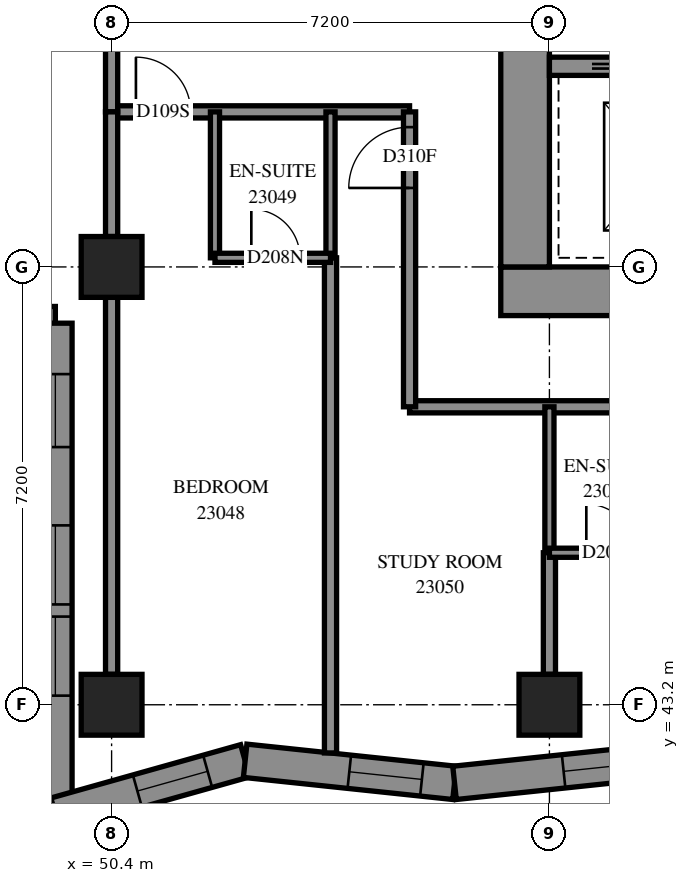
"""IFC4 building model, lengths in metres.
Left out: names, types, materials, properties, quantities, classifications, styles, units other than length and angle.
Written with IfcOpenShell. Run it as: python <this file> out.ifc"""

import sys

from ifc_helpers import new_model, si_unit, direction, frame, frame_2d, origin, origin_2d, place, context, subcontext, project, spatial, polyline, rectangle, outline, extrude, element, fill, save


model = new_model("IFC4")
c1 = context("Model", 3, precision=1e-05, world=origin(), true_north=direction((0.0, 1.0)))
c2 = subcontext(c1, "Body", "Model", "MODEL_VIEW")
j1 = project(units=[si_unit("LENGTHUNIT", "METRE"), si_unit("PLANEANGLEUNIT", "RADIAN")], contexts=[c1])
p1 = place(None, origin())
s1 = spatial("IfcSite", under=j1, at=p1, CompositionType="ELEMENT")
p2 = place(p1, origin())
s2 = spatial("IfcBuilding", under=s1, at=p2, CompositionType="ELEMENT")
p3 = place(p2, frame((0.0, 0.0, 88.0)))
s3 = spatial("IfcBuildingStorey", under=s2, at=p3, CompositionType="ELEMENT", Elevation=88.0)
for number, where, z_axis, x_axis in (
    (1, (50.4, 43.2, 0.0), (0.0, 0.0, 1.0), (1.0, 0.0, 0.0)),
    (2, (50.4, 50.4, 0.0), (0.0, 0.0, 1.0), (1.0, 0.0, 0.0)),
    (3, (57.6, 43.2, 0.0), (0.0, 0.0, 1.0), (1.0, 0.0, 0.0)),
):
    element("IfcColumn", number, at=place(p3, frame(where, z_axis=z_axis, x_axis=x_axis)), inside=s3, PredefinedType="COLUMN", context=c2, shape_type="SweptSolid", body=[
        extrude(rectangle(XDim=1.0, YDim=1.0, at=origin_2d()), origin(), (0.0, 0.0, 1.0), 3.1),
    ])
p4 = place(p3, frame((56.8, 50.0, -0.3), z_axis=(0.0, 0.0, 1.0), x_axis=(1.0, 0.0, 0.0)))
e4 = element("IfcWall", 4, at=p4, inside=s3, PredefinedType="SHEAR", context=c2, shape_type="SweptSolid", body=[
    extrude(rectangle(XDim=16.0, YDim=0.8, at=frame_2d((8.0, 0.0))), origin(), (0.0, 0.0, 1.0), 2.7),
])
p5 = place(p3, frame((57.2, 50.4, -0.3), z_axis=(0.0, 0.0, 1.0), x_axis=(0.0, 1.0, 0.0)))
e5 = element("IfcWall", 5, at=p5, inside=s3, PredefinedType="SHEAR", context=c2, shape_type="SweptSolid", body=[
    extrude(rectangle(XDim=14.4, YDim=0.8, at=frame_2d((7.2, 0.0))), origin(), (0.0, 0.0, 1.0), 2.7),
])
p6 = place(p5, frame((4.55, 0.0, 0.3)))
e6 = element("IfcOpeningElement", 6, at=p6, cuts=e5, PredefinedType="OPENING", context=c2, shape_type="SweptSolid", body=[
    extrude(rectangle(XDim=1.1, YDim=2.1, at=frame_2d((0.55, 1.05))), frame((0.0, 0.41, 0.0), z_axis=(0.0, -1.0, 0.0), x_axis=(1.0, 0.0, 0.0)), (0.0, 0.0, 1.0), 0.82),
])
p7 = place(p5, frame((11.35, 0.0, 0.3)))
e7 = element("IfcOpeningElement", 7, at=p7, cuts=e5, PredefinedType="OPENING", context=c2, shape_type="SweptSolid", body=[
    extrude(rectangle(XDim=1.1, YDim=2.1, at=frame_2d((0.55, 1.05))), frame((0.0, 0.41, 0.0), z_axis=(0.0, -1.0, 0.0), x_axis=(1.0, 0.0, 0.0)), (0.0, 0.0, 1.0), 0.82),
])
p8 = place(p3, frame((57.6, 53.7, 0.0), z_axis=(0.0, 0.0, 1.0), x_axis=(1.0, 0.0, 0.0)))
e8 = element("IfcWall", 8, at=p8, inside=s3, PredefinedType="SOLIDWALL", context=c2, shape_type="SweptSolid", body=[
    extrude(rectangle(XDim=14.4, YDim=0.3, at=frame_2d((7.2, 0.0))), origin(), (0.0, 0.0, 1.0), 3.1),
])
p9 = place(p8, frame((1.25, 0.0, 0.0)))
e9 = element("IfcOpeningElement", 9, at=p9, cuts=e8, PredefinedType="OPENING", context=c2, shape_type="SweptSolid", body=[
    extrude(rectangle(XDim=1.1, YDim=2.1, at=frame_2d((0.55, 1.05))), frame((0.0, 0.16, 0.0), z_axis=(0.0, -1.0, 0.0), x_axis=(1.0, 0.0, 0.0)), (0.0, 0.0, 1.0), 0.32),
])
p10 = place(p8, frame((4.85, 0.0, 0.0)))
e10 = element("IfcOpeningElement", 10, at=p10, cuts=e8, PredefinedType="OPENING", context=c2, shape_type="SweptSolid", body=[
    extrude(rectangle(XDim=1.1, YDim=2.1, at=frame_2d((0.55, 1.05))), frame((0.0, 0.16, 0.0), z_axis=(0.0, -1.0, 0.0), x_axis=(1.0, 0.0, 0.0)), (0.0, 0.0, 1.0), 0.32),
])
p11 = place(p8, frame((8.45, 0.0, 0.0)))
e11 = element("IfcOpeningElement", 11, at=p11, cuts=e8, PredefinedType="OPENING", context=c2, shape_type="SweptSolid", body=[
    extrude(rectangle(XDim=1.1, YDim=2.1, at=frame_2d((0.55, 1.05))), frame((0.0, 0.16, 0.0), z_axis=(0.0, -1.0, 0.0), x_axis=(1.0, 0.0, 0.0)), (0.0, 0.0, 1.0), 0.32),
])
p12 = place(p8, frame((12.05, 0.0, 0.0)))
e12 = element("IfcOpeningElement", 12, at=p12, cuts=e8, PredefinedType="OPENING", context=c2, shape_type="SweptSolid", body=[
    extrude(rectangle(XDim=1.1, YDim=2.1, at=frame_2d((0.55, 1.05))), frame((0.0, 0.16, 0.0), z_axis=(0.0, -1.0, 0.0), x_axis=(1.0, 0.0, 0.0)), (0.0, 0.0, 1.0), 0.32),
])
p13 = place(p3, frame((42.275, 49.475, 0.0), z_axis=(0.0, 0.0, 1.0), x_axis=(1.0, 0.0, 0.0)))
e13 = element("IfcWall", 13, at=p13, inside=s3, PredefinedType="SOLIDWALL", context=c2, shape_type="SweptSolid", body=[
    extrude(outline(polyline([(-0.275, -0.275), (6.925, -0.275), (7.475, 0.275), (0.275, 0.275), (-0.275, -0.275)])), origin(), (0.0, 0.0, 1.0), 3.1),
])
p14 = place(p13, frame((1.325, 0.0, 0.5)))
e14 = element("IfcOpeningElement", 14, at=p14, cuts=e13, PredefinedType="OPENING", context=c2, shape_type="SweptSolid", body=[
    extrude(rectangle(XDim=1.3, YDim=2.45, at=frame_2d((0.65, 1.225))), frame((0.0, 0.285, 0.0), z_axis=(0.0, -1.0, 0.0), x_axis=(1.0, 0.0, 0.0)), (0.0, 0.0, 1.0), 0.57),
])
p15 = place(p13, frame((2.825, 0.0, 0.5)))
e15 = element("IfcOpeningElement", 15, at=p15, cuts=e13, PredefinedType="OPENING", context=c2, shape_type="SweptSolid", body=[
    extrude(rectangle(XDim=1.3, YDim=2.45, at=frame_2d((0.65, 1.225))), frame((0.0, 0.285, 0.0), z_axis=(0.0, -1.0, 0.0), x_axis=(1.0, 0.0, 0.0)), (0.0, 0.0, 1.0), 0.57),
])
p16 = place(p13, frame((5.162, 0.0, 0.5)))
e16 = element("IfcOpeningElement", 16, at=p16, cuts=e13, PredefinedType="OPENING", context=c2, shape_type="SweptSolid", body=[
    extrude(rectangle(XDim=1.2, YDim=2.45, at=frame_2d((0.6, 1.225))), frame((0.0, 0.285, 0.0), z_axis=(0.0, -1.0, 0.0), x_axis=(1.0, 0.0, 0.0)), (0.0, 0.0, 1.0), 0.57),
])
p17 = place(p3, frame((49.475, 49.475, 0.0), z_axis=(0.0, 0.0, 1.0), x_axis=(0.0, -1.0, 0.0)))
e17 = element("IfcWall", 17, at=p17, inside=s3, PredefinedType="SOLIDWALL", context=c2, shape_type="SweptSolid", body=[
    extrude(outline(polyline([(0.275, -0.275), (8.436, -0.275), (7.71, 0.275), (-0.275, 0.275), (0.275, -0.275)])), origin(), (0.0, 0.0, 1.0), 3.1),
])
p18 = place(p17, frame((3.325, 0.0, 0.5)))
e18 = element("IfcOpeningElement", 18, at=p18, cuts=e17, PredefinedType="OPENING", context=c2, shape_type="SweptSolid", body=[
    extrude(rectangle(XDim=1.3, YDim=2.45, at=frame_2d((0.65, 1.225))), frame((0.0, 0.285, 0.0), z_axis=(0.0, -1.0, 0.0), x_axis=(1.0, 0.0, 0.0)), (0.0, 0.0, 1.0), 0.57),
])
p19 = place(p17, frame((4.825, 0.0, 0.5)))
e19 = element("IfcOpeningElement", 19, at=p19, cuts=e17, PredefinedType="OPENING", context=c2, shape_type="SweptSolid", body=[
    extrude(rectangle(XDim=1.3, YDim=2.45, at=frame_2d((0.65, 1.225))), frame((0.0, 0.285, 0.0), z_axis=(0.0, -1.0, 0.0), x_axis=(1.0, 0.0, 0.0)), (0.0, 0.0, 1.0), 0.57),
])
p20 = place(p17, frame((0.838, 0.0, 0.5)))
e20 = element("IfcOpeningElement", 20, at=p20, cuts=e17, PredefinedType="OPENING", context=c2, shape_type="SweptSolid", body=[
    extrude(rectangle(XDim=1.2, YDim=2.45, at=frame_2d((0.6, 1.225))), frame((0.0, 0.285, 0.0), z_axis=(0.0, -1.0, 0.0), x_axis=(1.0, 0.0, 0.0)), (0.0, 0.0, 1.0), 0.57),
])
p21 = place(p3, frame((49.475, 41.402, 0.0), z_axis=(0.0, 0.0, 1.0), x_axis=(0.9627079474, 0.2705428024, 0.0)))
e21 = element("IfcWall", 21, at=p21, inside=s3, PredefinedType="SOLIDWALL", context=c2, shape_type="SweptSolid", body=[
    extrude(outline(polyline([(-0.363, -0.275), (3.189, -0.275), (3.295, 0.275), (0.363, 0.275), (-0.363, -0.275)])), origin(), (0.0, 0.0, 1.0), 3.1),
])
p22 = place(p21, frame((1.401, 0.0, 0.5)))
e22 = element("IfcOpeningElement", 22, at=p22, cuts=e21, PredefinedType="OPENING", context=c2, shape_type="SweptSolid", body=[
    extrude(rectangle(XDim=1.2, YDim=2.45, at=frame_2d((0.6, 1.225))), frame((0.0, 0.285, 0.0), z_axis=(0.0, -1.0, 0.0), x_axis=(1.0, 0.0, 0.0)), (0.0, 0.0, 1.0), 0.57),
])
p23 = place(p3, frame((52.596, 42.279, 0.0), z_axis=(0.0, 0.0, 1.0), x_axis=(0.9944742336, -0.1049809444, 0.0)))
e23 = element("IfcWall", 23, at=p23, inside=s3, PredefinedType="SOLIDWALL", context=c2, shape_type="SweptSolid", body=[
    extrude(outline(polyline([(0.053, -0.275), (3.491, -0.275), (3.433, 0.275), (-0.053, 0.275), (0.053, -0.275)])), origin(), (0.0, 0.0, 1.0), 3.1),
])
p24 = place(p23, frame((1.723, 0.0, 0.5)))
e24 = element("IfcOpeningElement", 24, at=p24, cuts=e23, PredefinedType="OPENING", context=c2, shape_type="SweptSolid", body=[
    extrude(rectangle(XDim=1.2, YDim=2.45, at=frame_2d((0.6, 1.225))), frame((0.0, 0.285, 0.0), z_axis=(0.0, -1.0, 0.0), x_axis=(1.0, 0.0, 0.0)), (0.0, 0.0, 1.0), 0.57),
])
p25 = place(p3, frame((56.039, 41.916, 0.0), z_axis=(0.0, 0.0, 1.0), x_axis=(0.9944741767, 0.1049814831, 0.0)))
e25 = element("IfcWall", 25, at=p25, inside=s3, PredefinedType="SOLIDWALL", context=c2, shape_type="SweptSolid", body=[
    extrude(outline(polyline([(-0.029, -0.275), (3.41, -0.275), (3.468, 0.275), (0.029, 0.275), (-0.029, -0.275)])), origin(), (0.0, 0.0, 1.0), 3.1),
])
p26 = place(p25, frame((1.804, 0.0, 0.5)))
e26 = element("IfcOpeningElement", 26, at=p26, cuts=e25, PredefinedType="OPENING", context=c2, shape_type="SweptSolid", body=[
    extrude(rectangle(XDim=1.2, YDim=2.45, at=frame_2d((0.6, 1.225))), frame((0.0, 0.285, 0.0), z_axis=(0.0, -1.0, 0.0), x_axis=(1.0, 0.0, 0.0)), (0.0, 0.0, 1.0), 0.57),
])
p27 = place(p3, frame((55.3, 48.1, 0.0), z_axis=(0.0, 0.0, 1.0), x_axis=(1.0, 0.0, 0.0)))
e27 = element("IfcWall", 27, at=p27, inside=s3, PredefinedType="PARTITIONING", context=c2, shape_type="SweptSolid", body=[
    extrude(rectangle(XDim=19.092, YDim=0.2, at=frame_2d((9.546, 0.0))), origin(), (0.0, 0.0, 1.0), 3.1),
])
p28 = place(p27, frame((6.199, 0.0, 0.0)))
e28 = element("IfcOpeningElement", 28, at=p28, cuts=e27, PredefinedType="OPENING", context=c2, shape_type="SweptSolid", body=[
    extrude(rectangle(XDim=0.9, YDim=2.1, at=frame_2d((0.45, 1.05))), frame((0.0, 0.11, 0.0), z_axis=(0.0, -1.0, 0.0), x_axis=(1.0, 0.0, 0.0)), (0.0, 0.0, 1.0), 0.22),
])
p29 = place(p27, frame((13.363, 0.0, 0.0)))
e29 = element("IfcOpeningElement", 29, at=p29, cuts=e27, PredefinedType="OPENING", context=c2, shape_type="SweptSolid", body=[
    extrude(rectangle(XDim=1.0, YDim=2.1, at=frame_2d((0.5, 1.05))), frame((0.0, 0.11, 0.0), z_axis=(0.0, -1.0, 0.0), x_axis=(1.0, 0.0, 0.0)), (0.0, 0.0, 1.0), 0.22),
])
p30 = place(p3, frame((54.0, 42.407, 0.0), z_axis=(0.0, 0.0, 1.0), x_axis=(0.0, 1.0, 0.0)))
e30 = element("IfcWall", 30, at=p30, inside=s3, PredefinedType="PARTITIONING", context=c2, shape_type="SweptSolid", body=[
    extrude(rectangle(XDim=8.143, YDim=0.2, at=frame_2d((4.071, 0.0))), origin(), (0.0, 0.0, 1.0), 3.1),
])
p31 = place(p3, frame((50.4, 43.7, 0.0), z_axis=(0.0, 0.0, 1.0), x_axis=(0.0, 1.0, 0.0)))
e31 = element("IfcWall", 31, at=p31, inside=s3, PredefinedType="PARTITIONING", context=c2, shape_type="SweptSolid", body=[
    extrude(rectangle(XDim=6.2, YDim=0.2, at=frame_2d((3.1, 0.0))), origin(), (0.0, 0.0, 1.0), 2.6),
])
p32 = place(p3, frame((50.4, 52.95, 0.0), z_axis=(0.0, 0.0, 1.0), x_axis=(1.0, 0.0, 0.0)))
e32 = element("IfcWall", 32, at=p32, inside=s3, PredefinedType="PARTITIONING", context=c2, shape_type="SweptSolid", body=[
    extrude(rectangle(XDim=4.9, YDim=0.2, at=frame_2d((2.45, 0.0))), origin(), (0.0, 0.0, 1.0), 3.1),
])
p33 = place(p32, frame((0.4, 0.0, 0.0)))
e33 = element("IfcOpeningElement", 33, at=p33, cuts=e32, PredefinedType="OPENING", context=c2, shape_type="SweptSolid", body=[
    extrude(rectangle(XDim=0.9, YDim=2.1, at=frame_2d((0.45, 1.05))), frame((0.0, 0.11, 0.0), z_axis=(0.0, -1.0, 0.0), x_axis=(1.0, 0.0, 0.0)), (0.0, 0.0, 1.0), 0.22),
])
p34 = place(p3, frame((55.3, 48.1, 0.0), z_axis=(0.0, 0.0, 1.0), x_axis=(0.0, 1.0, 0.0)))
e34 = element("IfcWall", 34, at=p34, inside=s3, PredefinedType="PARTITIONING", context=c2, shape_type="SweptSolid", body=[
    extrude(rectangle(XDim=4.85, YDim=0.2, at=frame_2d((2.425, 0.0))), origin(), (0.0, 0.0, 1.0), 3.1),
])
p35 = place(p34, frame((3.599, 0.0, 0.0)))
e35 = element("IfcOpeningElement", 35, at=p35, cuts=e34, PredefinedType="OPENING", context=c2, shape_type="SweptSolid", body=[
    extrude(rectangle(XDim=1.0, YDim=2.1, at=frame_2d((0.5, 1.05))), frame((0.0, 0.11, 0.0), z_axis=(0.0, -1.0, 0.0), x_axis=(1.0, 0.0, 0.0)), (0.0, 0.0, 1.0), 0.22),
])
for number, where, z_axis, x_axis in (
    (36, (52.1, 50.55, 0.0), (0.0, 0.0, 1.0), (0.0, 1.0, 0.0)),
    (37, (54.0, 50.55, 0.0), (0.0, 0.0, 1.0), (0.0, 1.0, 0.0)),
    (38, (57.6, 45.7, 0.0), (0.0, 0.0, 1.0), (0.0, 1.0, 0.0)),
):
    element("IfcWall", number, at=place(p3, frame(where, z_axis=z_axis, x_axis=x_axis)), inside=s3, PredefinedType="PARTITIONING", context=c2, shape_type="SweptSolid", body=[
        extrude(rectangle(XDim=2.4, YDim=0.15, at=frame_2d((1.2, 0.0))), origin(), (0.0, 0.0, 1.0), 3.1),
    ])
p36 = place(p3, frame((50.4, 52.95, 0.0), z_axis=(0.0, 0.0, 1.0), x_axis=(0.0, 1.0, 0.0)))
e39 = element("IfcWall", 39, at=p36, inside=s3, PredefinedType="PARTITIONING", context=c2, shape_type="SweptSolid", body=[
    extrude(rectangle(XDim=2.1, YDim=0.2, at=frame_2d((1.05, 0.0))), origin(), (0.0, 0.0, 1.0), 3.1),
])
p37 = place(p3, frame((50.4, 50.9, 0.0), z_axis=(0.0, 0.0, 1.0), x_axis=(0.0, 1.0, 0.0)))
e40 = element("IfcWall", 40, at=p37, inside=s3, PredefinedType="PARTITIONING", context=c2, shape_type="SweptSolid", body=[
    extrude(rectangle(XDim=2.05, YDim=0.2, at=frame_2d((1.025, 0.0))), origin(), (0.0, 0.0, 1.0), 3.1),
])
p38 = place(p3, frame((57.6, 43.7, 0.0), z_axis=(0.0, 0.0, 1.0), x_axis=(0.0, 1.0, 0.0)))
e41 = element("IfcWall", 41, at=p38, inside=s3, PredefinedType="PARTITIONING", context=c2, shape_type="SweptSolid", body=[
    extrude(rectangle(XDim=2.0, YDim=0.2, at=frame_2d((1.0, 0.0))), origin(), (0.0, 0.0, 1.0), 3.1),
])
p39 = place(p3, frame((52.1, 50.55, 0.0), z_axis=(0.0, 0.0, 1.0), x_axis=(1.0, 0.0, 0.0)))
e42 = element("IfcWall", 42, at=p39, inside=s3, PredefinedType="PARTITIONING", context=c2, shape_type="SweptSolid", body=[
    extrude(rectangle(XDim=1.9, YDim=0.15, at=frame_2d((0.95, 0.0))), origin(), (0.0, 0.0, 1.0), 3.1),
])
p40 = place(p39, frame((0.598, 0.0, 0.0)))
e43 = element("IfcOpeningElement", 43, at=p40, cuts=e42, PredefinedType="OPENING", context=c2, shape_type="SweptSolid", body=[
    extrude(rectangle(XDim=0.8, YDim=2.1, at=frame_2d((0.4, 1.05))), frame((0.0, 0.085, 0.0), z_axis=(0.0, -1.0, 0.0), x_axis=(1.0, 0.0, 0.0)), (0.0, 0.0, 1.0), 0.17),
])
p41 = place(p3, frame((57.6, 45.7, 0.0), z_axis=(0.0, 0.0, 1.0), x_axis=(1.0, 0.0, 0.0)))
e44 = element("IfcWall", 44, at=p41, inside=s3, PredefinedType="PARTITIONING", context=c2, shape_type="SweptSolid", body=[
    extrude(rectangle(XDim=1.9, YDim=0.15, at=frame_2d((0.95, 0.0))), origin(), (0.0, 0.0, 1.0), 3.1),
])
p42 = place(p41, frame((0.607, 0.0, 0.0)))
e45 = element("IfcOpeningElement", 45, at=p42, cuts=e44, PredefinedType="OPENING", context=c2, shape_type="SweptSolid", body=[
    extrude(rectangle(XDim=0.8, YDim=2.1, at=frame_2d((0.4, 1.05))), frame((0.0, 0.085, 0.0), z_axis=(0.0, -1.0, 0.0), x_axis=(1.0, 0.0, 0.0)), (0.0, 0.0, 1.0), 0.17),
])
p43 = place(p18, origin())
e46 = element("IfcWindow", 46, at=p43, inside=s3, PartitioningType="SINGLE_PANEL", PredefinedType="WINDOW", context=c2, shape_type="SweptSolid", body=[
    extrude(rectangle(XDim=1.3, YDim=2.45, at=frame_2d((0.65, 1.225))), frame((0.0, 0.155, 0.0), z_axis=(0.0, -1.0, 0.0), x_axis=(1.0, 0.0, 0.0)), (0.0, 0.0, 1.0), 0.06),
])
fill(e18, e46)
p44 = place(p19, origin())
e47 = element("IfcWindow", 47, at=p44, inside=s3, PartitioningType="SINGLE_PANEL", PredefinedType="WINDOW", context=c2, shape_type="SweptSolid", body=[
    extrude(rectangle(XDim=1.3, YDim=2.45, at=frame_2d((0.65, 1.225))), frame((0.0, 0.155, 0.0), z_axis=(0.0, -1.0, 0.0), x_axis=(1.0, 0.0, 0.0)), (0.0, 0.0, 1.0), 0.06),
])
fill(e19, e47)
p45 = place(p20, origin())
e48 = element("IfcWindow", 48, at=p45, inside=s3, PartitioningType="SINGLE_PANEL", PredefinedType="WINDOW", context=c2, shape_type="SweptSolid", body=[
    extrude(rectangle(XDim=1.2, YDim=2.45, at=frame_2d((0.6, 1.225))), frame((0.0, 0.155, 0.0), z_axis=(0.0, -1.0, 0.0), x_axis=(1.0, 0.0, 0.0)), (0.0, 0.0, 1.0), 0.06),
])
fill(e20, e48)
p46 = place(p22, origin())
e49 = element("IfcWindow", 49, at=p46, inside=s3, PartitioningType="SINGLE_PANEL", PredefinedType="WINDOW", context=c2, shape_type="SweptSolid", body=[
    extrude(rectangle(XDim=1.2, YDim=2.45, at=frame_2d((0.6, 1.225))), frame((0.0, 0.155, 0.0), z_axis=(0.0, -1.0, 0.0), x_axis=(1.0, 0.0, 0.0)), (0.0, 0.0, 1.0), 0.06),
])
fill(e22, e49)
p47 = place(p24, origin())
e50 = element("IfcWindow", 50, at=p47, inside=s3, PartitioningType="SINGLE_PANEL", PredefinedType="WINDOW", context=c2, shape_type="SweptSolid", body=[
    extrude(rectangle(XDim=1.2, YDim=2.45, at=frame_2d((0.6, 1.225))), frame((0.0, 0.155, 0.0), z_axis=(0.0, -1.0, 0.0), x_axis=(1.0, 0.0, 0.0)), (0.0, 0.0, 1.0), 0.06),
])
fill(e24, e50)
p48 = place(p26, origin())
e51 = element("IfcWindow", 51, at=p48, inside=s3, PartitioningType="SINGLE_PANEL", PredefinedType="WINDOW", context=c2, shape_type="SweptSolid", body=[
    extrude(rectangle(XDim=1.2, YDim=2.45, at=frame_2d((0.6, 1.225))), frame((0.0, 0.155, 0.0), z_axis=(0.0, -1.0, 0.0), x_axis=(1.0, 0.0, 0.0)), (0.0, 0.0, 1.0), 0.06),
])
fill(e26, e51)
p49 = place(p33, origin())
e52 = element("IfcDoor", 52, at=p49, inside=s3, OperationType="SINGLE_SWING_LEFT", PredefinedType="DOOR", context=c2, shape_type="SweptSolid", body=[
    extrude(rectangle(XDim=0.9, YDim=2.1, at=frame_2d((0.45, 1.05))), frame((0.0, 0.025, 0.0), z_axis=(0.0, -1.0, 0.0), x_axis=(1.0, 0.0, 0.0)), (0.0, 0.0, 1.0), 0.05),
])
fill(e33, e52)
p50 = place(p40, origin())
e53 = element("IfcDoor", 53, at=p50, inside=s3, OperationType="SINGLE_SWING_RIGHT", PredefinedType="DOOR", context=c2, shape_type="SweptSolid", body=[
    extrude(rectangle(XDim=0.8, YDim=2.1, at=frame_2d((0.4, 1.05))), frame((0.0, 0.025, 0.0), z_axis=(0.0, -1.0, 0.0), x_axis=(1.0, 0.0, 0.0)), (0.0, 0.0, 1.0), 0.05),
])
fill(e43, e53)
p51 = place(p35, origin())
e54 = element("IfcDoor", 54, at=p51, inside=s3, OperationType="SINGLE_SWING_RIGHT", PredefinedType="DOOR", context=c2, shape_type="SweptSolid", body=[
    extrude(rectangle(XDim=1.0, YDim=2.1, at=frame_2d((0.5, 1.05))), frame((0.0, 0.025, 0.0), z_axis=(0.0, -1.0, 0.0), x_axis=(1.0, 0.0, 0.0)), (0.0, 0.0, 1.0), 0.05),
])
fill(e35, e54)
p52 = place(p42, origin())
e55 = element("IfcDoor", 55, at=p52, inside=s3, OperationType="SINGLE_SWING_RIGHT", PredefinedType="DOOR", context=c2, shape_type="SweptSolid", body=[
    extrude(rectangle(XDim=0.8, YDim=2.1, at=frame_2d((0.4, 1.05))), frame((0.0, 0.025, 0.0), z_axis=(0.0, -1.0, 0.0), x_axis=(1.0, 0.0, 0.0)), (0.0, 0.0, 1.0), 0.05),
])
fill(e45, e55)
save(model, sys.argv[1])
